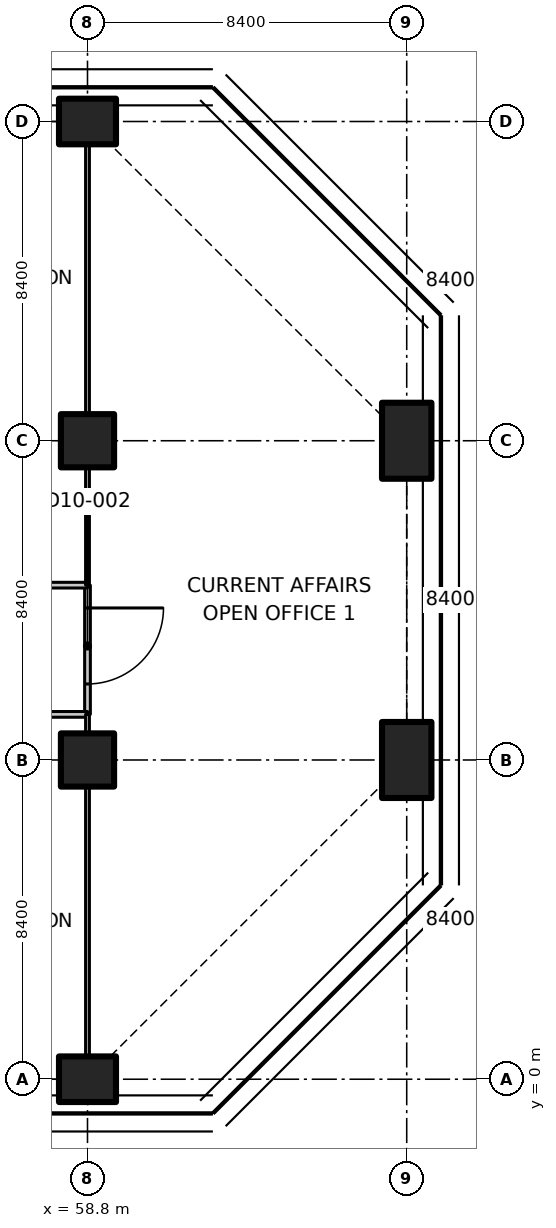
"""IFC4 building model, lengths in metres.
Left out: names, types, materials, properties, quantities, classifications, styles, units other than length and angle.
Written with IfcOpenShell. Run it as: python <this file> out.ifc"""

import sys

from ifc_helpers import new_model, si_unit, direction, frame, frame_2d, origin, origin_2d, place, context, subcontext, project, spatial, rectangle, extrude, element, fill, save


model = new_model("IFC4")
c1 = context("Model", 3, precision=1e-05, world=origin(), true_north=direction((0.0, 1.0)))
c2 = subcontext(c1, "Body", "Model", "MODEL_VIEW")
j1 = project(units=[si_unit("LENGTHUNIT", "METRE"), si_unit("PLANEANGLEUNIT", "RADIAN")], contexts=[c1])
p1 = place(None, origin())
s1 = spatial("IfcSite", under=j1, at=p1, CompositionType="ELEMENT")
p2 = place(p1, origin())
s2 = spatial("IfcBuilding", under=s1, at=p2, CompositionType="ELEMENT")
p3 = place(p2, frame((0.0, 0.0, 76.1)))
s3 = spatial("IfcBuildingStorey", under=s2, at=p3, CompositionType="ELEMENT", Elevation=76.1)
p4 = place(p3, frame((58.8, 0.0, 0.0), z_axis=(0.0, 0.0, 1.0), x_axis=(0.0, 1.0, 0.0)))
e1 = element("IfcColumn", 1, at=p4, inside=s3, PredefinedType="COLUMN", context=c2, shape_type="SweptSolid", body=[
    extrude(rectangle(XDim=1.2, YDim=1.5, at=origin_2d()), origin(), (0.0, 0.0, 1.0), 3.35),
])
for number, where, z_axis, x_axis in (
    (2, (58.8, 8.4, 0.0), (0.0, 0.0, 1.0), (1.0, 0.0, 0.0)),
    (3, (58.8, 16.8, 0.0), (0.0, 0.0, 1.0), (1.0, 0.0, 0.0)),
):
    element("IfcColumn", number, at=place(p3, frame(where, z_axis=z_axis, x_axis=x_axis)), inside=s3, PredefinedType="COLUMN", context=c2, shape_type="SweptSolid", body=[
        extrude(rectangle(XDim=1.4, YDim=1.4, at=origin_2d()), origin(), (0.0, 0.0, 1.0), 3.35),
    ])
p5 = place(p3, frame((58.8, 25.2, 0.0), z_axis=(0.0, 0.0, 1.0), x_axis=(0.0, 1.0, 0.0)))
e4 = element("IfcColumn", 4, at=p5, inside=s3, PredefinedType="COLUMN", context=c2, shape_type="SweptSolid", body=[
    extrude(rectangle(XDim=1.2, YDim=1.5, at=origin_2d()), origin(), (0.0, 0.0, 1.0), 3.35),
])
for number, where, z_axis, x_axis in (
    (5, (67.2, 8.4, 0.0), (0.0, 0.0, 1.0), (1.0, 0.0, 0.0)),
    (6, (67.2, 16.8, 0.0), (0.0, 0.0, 1.0), (1.0, 0.0, 0.0)),
):
    element("IfcColumn", number, at=place(p3, frame(where, z_axis=z_axis, x_axis=x_axis)), inside=s3, PredefinedType="COLUMN", context=c2, shape_type="SweptSolid", body=[
        extrude(rectangle(XDim=1.3, YDim=2.0, at=origin_2d()), origin(), (0.0, 0.0, 1.0), 3.35),
    ])
p6 = place(p3, frame((58.8, 13.0, 0.0), z_axis=(0.0, 0.0, 1.0), x_axis=(0.0, -1.0, 0.0)))
e7 = element("IfcWall", 7, at=p6, inside=s3, PredefinedType="PARTITIONING", context=c2, shape_type="SweptSolid", body=[
    extrude(rectangle(XDim=3.4, YDim=0.15, at=frame_2d((1.7, 0.0))), origin(), (0.0, 0.0, 1.0), 3.33),
])
p7 = place(p6, frame((0.6, 0.0, 0.0)))
e8 = element("IfcOpeningElement", 8, at=p7, cuts=e7, PredefinedType="OPENING", context=c2, shape_type="SweptSolid", body=[
    extrude(rectangle(XDim=2.0, YDim=2.4, at=frame_2d((1.0, 1.2))), frame((0.0, 0.085, 0.0), z_axis=(0.0, -1.0, 0.0), x_axis=(1.0, 0.0, 0.0)), (0.0, 0.0, 1.0), 0.17),
])
p8 = place(p3, frame((58.8, 9.6, 0.0), z_axis=(0.0, 0.0, 1.0), x_axis=(-1.0, 0.0, 0.0)))
e9 = element("IfcWall", 9, at=p8, inside=s3, PredefinedType="PARTITIONING", context=c2, shape_type="SweptSolid", body=[
    extrude(rectangle(XDim=4.2, YDim=0.15, at=frame_2d((2.1, 0.0))), origin(), (0.0, 0.0, 1.0), 3.33),
])
p9 = place(p8, frame((1.5, 0.0, 0.0)))
e10 = element("IfcOpeningElement", 10, at=p9, cuts=e9, PredefinedType="OPENING", context=c2, shape_type="SweptSolid", body=[
    extrude(rectangle(XDim=1.1, YDim=2.1, at=frame_2d((0.55, 1.05))), frame((0.0, 0.085, 0.0), z_axis=(0.0, -1.0, 0.0), x_axis=(1.0, 0.0, 0.0)), (0.0, 0.0, 1.0), 0.17),
])
p10 = place(p3, frame((54.6, 13.0, 0.0), z_axis=(0.0, 0.0, 1.0), x_axis=(1.0, 0.0, 0.0)))
e11 = element("IfcWall", 11, at=p10, inside=s3, PredefinedType="PARTITIONING", context=c2, shape_type="SweptSolid", body=[
    extrude(rectangle(XDim=4.2, YDim=0.15, at=frame_2d((2.1, 0.0))), origin(), (0.0, 0.0, 1.0), 3.33),
])
p11 = place(p10, frame((1.5, 0.0, 0.0)))
e12 = element("IfcOpeningElement", 12, at=p11, cuts=e11, PredefinedType="OPENING", context=c2, shape_type="SweptSolid", body=[
    extrude(rectangle(XDim=1.1, YDim=2.1, at=frame_2d((0.55, 1.05))), frame((0.0, 0.085, 0.0), z_axis=(0.0, -1.0, 0.0), x_axis=(1.0, 0.0, 0.0)), (0.0, 0.0, 1.0), 0.17),
])
p12 = place(p3, frame((58.8, 0.62, 0.0), z_axis=(0.0, 0.0, 1.0), x_axis=(0.0, 1.0, 0.0)))
e13 = element("IfcWall", 13, at=p12, inside=s3, PredefinedType="PARTITIONING", context=c2, shape_type="SweptSolid", body=[
    extrude(rectangle(XDim=7.06, YDim=0.1, at=frame_2d((3.53, 0.0))), origin(), (0.0, 0.0, 1.0), 3.33),
])
p13 = place(p3, frame((58.8, 9.12, 0.0), z_axis=(0.0, 0.0, 1.0), x_axis=(0.0, 1.0, 0.0)))
e14 = element("IfcWall", 14, at=p13, inside=s3, PredefinedType="PARTITIONING", context=c2, shape_type="SweptSolid", body=[
    extrude(rectangle(XDim=0.48, YDim=0.1, at=frame_2d((0.24, 0.0))), origin(), (0.0, 0.0, 1.0), 3.33),
])
p14 = place(p3, frame((58.8, 13.0, 0.0), z_axis=(0.0, 0.0, 1.0), x_axis=(0.0, 1.0, 0.0)))
e15 = element("IfcWall", 15, at=p14, inside=s3, PredefinedType="PARTITIONING", context=c2, shape_type="SweptSolid", body=[
    extrude(rectangle(XDim=3.08, YDim=0.1, at=frame_2d((1.54, 0.0))), origin(), (0.0, 0.0, 1.0), 3.33),
])
p15 = place(p3, frame((58.8, 17.52, 0.0), z_axis=(0.0, 0.0, 1.0), x_axis=(0.0, 1.0, 0.0)))
e16 = element("IfcWall", 16, at=p15, inside=s3, PredefinedType="PARTITIONING", context=c2, shape_type="SweptSolid", body=[
    extrude(rectangle(XDim=7.06, YDim=0.1, at=frame_2d((3.53, 0.0))), origin(), (0.0, 0.0, 1.0), 3.33),
])
p16 = place(p7, origin())
e17 = element("IfcDoor", 17, at=p16, inside=s3, OperationType="DOUBLE_DOOR_SINGLE_SWING", PredefinedType="DOOR", context=c2, shape_type="SweptSolid", body=[
    extrude(rectangle(XDim=2.0, YDim=2.4, at=frame_2d((1.0, 1.2))), frame((0.0, 0.025, 0.0), z_axis=(0.0, -1.0, 0.0), x_axis=(1.0, 0.0, 0.0)), (0.0, 0.0, 1.0), 0.05),
])
fill(e8, e17)
save(model, sys.argv[1])
